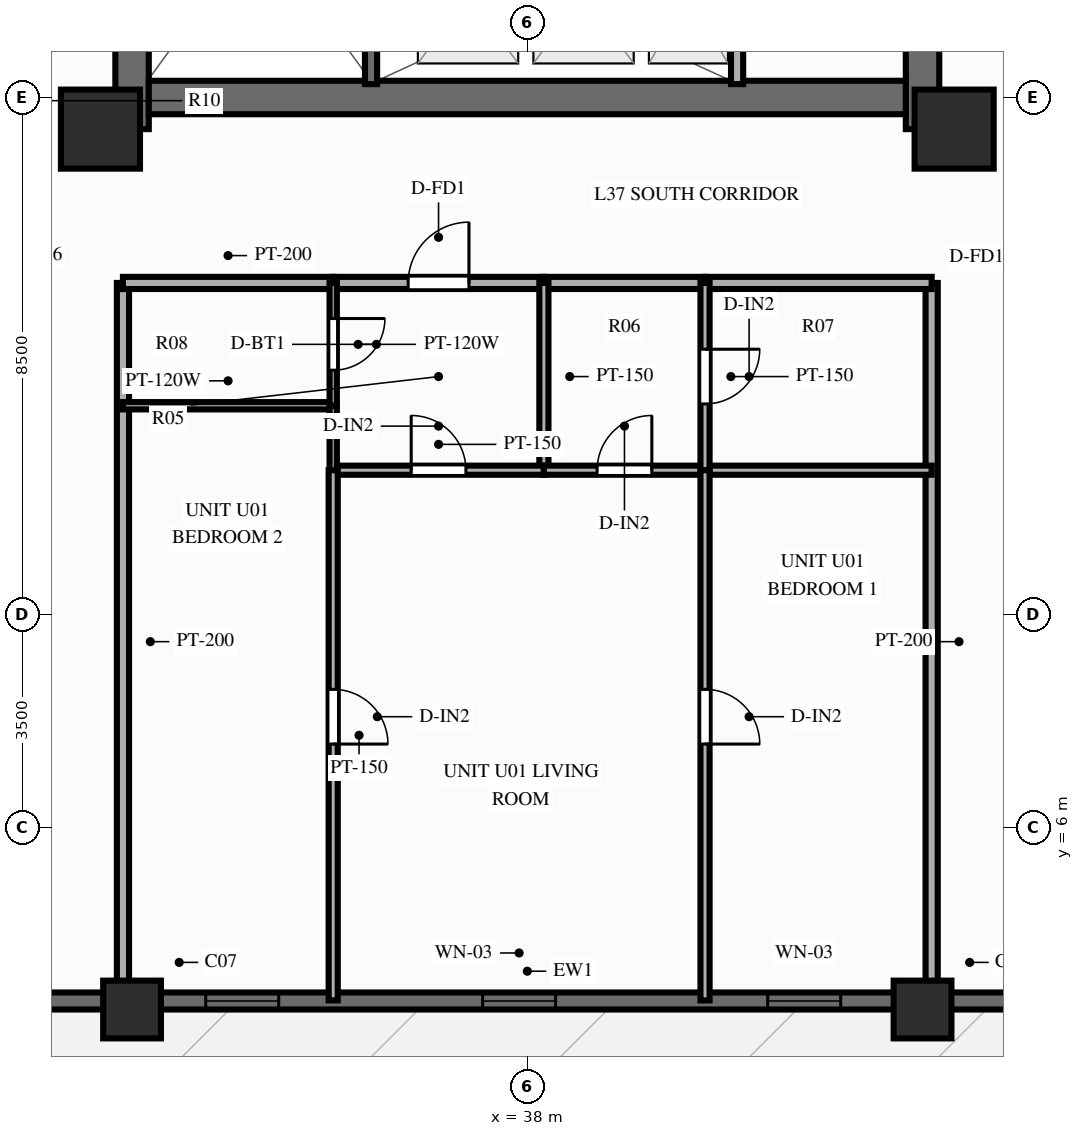
"""IFC4 building model, lengths in metres.
Left out: names, types, materials, properties, quantities, classifications, styles, units other than length and angle.
Written with IfcOpenShell. Run it as: python <this file> out.ifc"""

import sys

from ifc_helpers import new_model, si_unit, direction, frame, frame_2d, origin, origin_2d, place, context, subcontext, project, spatial, rectangle, extrude, source, transform, mapped, element, fill, save


model = new_model("IFC4")
c1 = context("Model", 3, precision=1e-05, world=origin(), true_north=direction((0.0, 1.0)))
c2 = subcontext(c1, "Body", "Model", "MODEL_VIEW")
j1 = project(units=[si_unit("LENGTHUNIT", "METRE"), si_unit("PLANEANGLEUNIT", "RADIAN")], contexts=[c1])
p1 = place(None, origin())
s1 = spatial("IfcSite", under=j1, at=p1, CompositionType="ELEMENT")
p2 = place(p1, origin())
s2 = spatial("IfcBuilding", under=s1, at=p2, CompositionType="ELEMENT")
p3 = place(p2, frame((0.0, 0.0, 116.85)))
s3 = spatial("IfcBuildingStorey", under=s2, at=p3, CompositionType="ELEMENT", Elevation=116.85)
p4 = place(p3, frame((31.5, 17.48, 0.0), z_axis=(0.0, 0.0, 1.0), x_axis=(0.0, 1.0, 0.0)))
e1 = element("IfcWall", 1, at=p4, inside=s3, PredefinedType="SHEAR", context=c2, shape_type="SweptSolid", body=[
    extrude(rectangle(XDim=19.04, YDim=0.55, at=frame_2d((9.52, 0.0))), origin(), (0.0, 0.0, 1.0), 3.0),
])
p5 = place(p4, frame((6.32, 0.0, 0.0)))
e2 = element("IfcOpeningElement", 2, at=p5, cuts=e1, PredefinedType="OPENING", context=c2, shape_type="SweptSolid", body=[
    extrude(rectangle(XDim=1.1, YDim=2.15, at=frame_2d((0.55, 1.075))), frame((0.0, 0.287, 0.0), z_axis=(0.0, -1.0, 0.0), x_axis=(1.0, 0.0, 0.0)), (0.0, 0.0, 1.0), 0.574),
])
p6 = place(p3, frame((44.5, 17.48, 0.0), z_axis=(0.0, 0.0, 1.0), x_axis=(0.0, 1.0, 0.0)))
e3 = element("IfcWall", 3, at=p6, inside=s3, PredefinedType="SHEAR", context=c2, shape_type="SweptSolid", body=[
    extrude(rectangle(XDim=19.04, YDim=0.55, at=frame_2d((9.52, 0.0))), origin(), (0.0, 0.0, 1.0), 3.0),
])
p7 = place(p6, frame((12.67, 0.0, 0.0), z_axis=(0.0, 0.0, 1.0), x_axis=(-1.0, 0.0, 0.0)))
e4 = element("IfcOpeningElement", 4, at=p7, cuts=e3, PredefinedType="OPENING", context=c2, shape_type="SweptSolid", body=[
    extrude(rectangle(XDim=1.1, YDim=2.15, at=frame_2d((0.55, 1.075))), frame((0.0, 0.287, 0.0), z_axis=(0.0, -1.0, 0.0), x_axis=(1.0, 0.0, 0.0)), (0.0, 0.0, 1.0), 0.574),
])
p8 = place(p3, frame((31.775, 18.0, 0.0), z_axis=(0.0, 0.0, 1.0), x_axis=(1.0, 0.0, 0.0)))
e5 = element("IfcWall", 5, at=p8, inside=s3, PredefinedType="SHEAR", context=c2, shape_type="SweptSolid", body=[
    extrude(rectangle(XDim=12.45, YDim=0.55, at=frame_2d((6.225, 0.0))), origin(), (0.0, 0.0, 1.0), 3.0),
])
m1 = source(origin(), c2, "Body", "SweptSolid", [
    extrude(rectangle(XDim=1.3, YDim=1.3, at=origin_2d()), origin(), (0.0, 0.0, 1.0), 3.0),
])
for number, where, z_axis, x_axis in (
    (6, (30.98, 17.48, 0.0), (0.0, 0.0, 1.0), (1.0, 0.0, 0.0)),
    (7, (45.02, 17.48, 0.0), (0.0, 0.0, 1.0), (1.0, 0.0, 0.0)),
):
    element("IfcColumn", number, at=place(p3, frame(where, z_axis=z_axis, x_axis=x_axis)), inside=s3, PredefinedType="COLUMN", context=c2, shape_type="MappedRepresentation", body=[
        mapped(m1, transform((0.0, 0.0, 0.0), scale=1.0)),
    ])
m2 = source(origin(), c2, "Body", "SweptSolid", [
    extrude(rectangle(XDim=0.95, YDim=0.95, at=origin_2d()), origin(), (0.0, 0.0, 1.0), 3.0),
])
for number, where, z_axis, x_axis in (
    (8, (31.5, 3.0, 0.0), (0.0, 0.0, 1.0), (1.0, 0.0, 0.0)),
    (9, (44.5, 3.0, 0.0), (0.0, 0.0, 1.0), (1.0, 0.0, 0.0)),
):
    element("IfcColumn", number, at=place(p3, frame(where, z_axis=z_axis, x_axis=x_axis)), inside=s3, PredefinedType="COLUMN", context=c2, shape_type="MappedRepresentation", body=[
        mapped(m2, transform((0.0, 0.0, 0.0), scale=1.0)),
    ])
p9 = place(p3, frame((16.2, 3.14, 0.0), z_axis=(0.0, 0.0, 1.0), x_axis=(1.0, 0.0, 0.0)))
e10 = element("IfcWall", 10, at=p9, inside=s3, PredefinedType="SOLIDWALL", context=c2, shape_type="SweptSolid", body=[
    extrude(rectangle(XDim=43.6, YDim=0.28, at=frame_2d((21.8, 0.0))), origin(), (0.0, 0.0, 1.0), 2.28),
])
p10 = place(p9, frame((8.2, 0.0, 0.0), z_axis=(0.0, 0.0, 1.0), x_axis=(-1.0, 0.0, 0.0)))
e11 = element("IfcOpeningElement", 11, at=p10, cuts=e10, PredefinedType="OPENING", context=c2, shape_type="SweptSolid", body=[
    extrude(rectangle(XDim=1.1, YDim=2.15, at=frame_2d((0.55, 1.075))), frame((0.0, 0.152, 0.0), z_axis=(0.0, -1.0, 0.0), x_axis=(1.0, 0.0, 0.0)), (0.0, 0.0, 1.0), 0.304),
])
p11 = place(p9, frame((16.511, 0.0, 0.25)))
e12 = element("IfcOpeningElement", 12, at=p11, cuts=e10, PredefinedType="OPENING", context=c2, shape_type="SweptSolid", body=[
    extrude(rectangle(XDim=1.2, YDim=1.5, at=frame_2d((0.6, 0.75))), frame((0.0, 0.152, 0.0), z_axis=(0.0, -1.0, 0.0), x_axis=(1.0, 0.0, 0.0)), (0.0, 0.0, 1.0), 0.304),
])
p12 = place(p9, frame((21.065, 0.0, 0.25)))
e13 = element("IfcOpeningElement", 13, at=p12, cuts=e10, PredefinedType="OPENING", context=c2, shape_type="SweptSolid", body=[
    extrude(rectangle(XDim=1.2, YDim=1.5, at=frame_2d((0.6, 0.75))), frame((0.0, 0.152, 0.0), z_axis=(0.0, -1.0, 0.0), x_axis=(1.0, 0.0, 0.0)), (0.0, 0.0, 1.0), 0.304),
])
p13 = place(p9, frame((25.754, 0.0, 0.25)))
e14 = element("IfcOpeningElement", 14, at=p13, cuts=e10, PredefinedType="OPENING", context=c2, shape_type="SweptSolid", body=[
    extrude(rectangle(XDim=1.2, YDim=1.5, at=frame_2d((0.6, 0.75))), frame((0.0, 0.152, 0.0), z_axis=(0.0, -1.0, 0.0), x_axis=(1.0, 0.0, 0.0)), (0.0, 0.0, 1.0), 0.304),
])
p14 = place(p9, frame((35.35, 0.0, 0.25)))
e15 = element("IfcOpeningElement", 15, at=p14, cuts=e10, PredefinedType="OPENING", context=c2, shape_type="SweptSolid", body=[
    extrude(rectangle(XDim=1.2, YDim=1.5, at=frame_2d((0.6, 0.75))), frame((0.0, 0.152, 0.0), z_axis=(0.0, -1.0, 0.0), x_axis=(1.0, 0.0, 0.0)), (0.0, 0.0, 1.0), 0.304),
])
p15 = place(p3, frame((41.45, 18.22, 0.0), z_axis=(0.0, 0.0, 1.0), x_axis=(0.0, 1.0, 0.0)))
e16 = element("IfcWall", 16, at=p15, inside=s3, PredefinedType="PARTITIONING", context=c2, shape_type="SweptSolid", body=[
    extrude(rectangle(XDim=2.96, YDim=0.2, at=frame_2d((1.48, 0.0))), origin(), (0.0, 0.0, 1.0), 2.79),
])
p16 = place(p3, frame((35.43, 18.22, 0.0), z_axis=(0.0, 0.0, 1.0), x_axis=(0.0, 1.0, 0.0)))
e17 = element("IfcWall", 17, at=p16, inside=s3, PredefinedType="SOLIDWALL", context=c2, shape_type="SweptSolid", body=[
    extrude(rectangle(XDim=7.22, YDim=0.2, at=frame_2d((3.61, 0.0))), origin(), (0.0, 0.0, 1.0), 2.79),
])
p17 = place(p16, frame((6.68, 0.0, 0.0), z_axis=(0.0, 0.0, 1.0), x_axis=(-1.0, 0.0, 0.0)))
e18 = element("IfcOpeningElement", 18, at=p17, cuts=e17, PredefinedType="OPENING", context=c2, shape_type="SweptSolid", body=[
    extrude(rectangle(XDim=1.1, YDim=2.15, at=frame_2d((0.55, 1.075))), frame((0.0, 0.112, 0.0), z_axis=(0.0, -1.0, 0.0), x_axis=(1.0, 0.0, 0.0)), (0.0, 0.0, 1.0), 0.224),
])
for number, where, z_axis, x_axis in (
    (19, (31.35, 14.95, 0.0), (0.0, 0.0, 1.0), (0.0, -1.0, 0.0)),
    (20, (44.65, 14.95, 0.0), (0.0, 0.0, 1.0), (0.0, -1.0, 0.0)),
):
    element("IfcWall", number, at=place(p3, frame(where, z_axis=z_axis, x_axis=x_axis)), inside=s3, PredefinedType="PARTITIONING", context=c2, shape_type="SweptSolid", body=[
        extrude(rectangle(XDim=11.8, YDim=0.2, at=frame_2d((5.9, 0.0))), origin(), (0.0, 0.0, 1.0), 2.34),
    ])
p18 = place(p3, frame((31.35, 14.95, 0.0), z_axis=(0.0, 0.0, 1.0), x_axis=(1.0, 0.0, 0.0)))
e21 = element("IfcWall", 21, at=p18, inside=s3, PredefinedType="PARTITIONING", context=c2, shape_type="SweptSolid", body=[
    extrude(rectangle(XDim=3.458, YDim=0.2, at=frame_2d((1.729, 0.0))), origin(), (0.0, 0.0, 1.0), 2.79),
])
p19 = place(p3, frame((34.808, 14.95, 0.0), z_axis=(0.0, 0.0, 1.0), x_axis=(1.0, 0.0, 0.0)))
e22 = element("IfcWall", 22, at=p19, inside=s3, PredefinedType="PARTITIONING", context=c2, shape_type="SweptSolid", body=[
    extrude(rectangle(XDim=3.465, YDim=0.2, at=frame_2d((1.732, 0.0))), origin(), (0.0, 0.0, 1.0), 2.79),
])
p20 = place(p19, frame((1.232, 0.0, 0.0)))
e23 = element("IfcOpeningElement", 23, at=p20, cuts=e22, PredefinedType="OPENING", context=c2, shape_type="SweptSolid", body=[
    extrude(rectangle(XDim=1.0, YDim=2.15, at=frame_2d((0.5, 1.075))), frame((0.0, 0.112, 0.0), z_axis=(0.0, -1.0, 0.0), x_axis=(1.0, 0.0, 0.0)), (0.0, 0.0, 1.0), 0.224),
])
p21 = place(p3, frame((38.273, 14.95, 0.0), z_axis=(0.0, 0.0, 1.0), x_axis=(1.0, 0.0, 0.0)))
e24 = element("IfcWall", 24, at=p21, inside=s3, PredefinedType="PARTITIONING", context=c2, shape_type="SweptSolid", body=[
    extrude(rectangle(XDim=2.65, YDim=0.2, at=frame_2d((1.325, 0.0))), origin(), (0.0, 0.0, 1.0), 2.79),
])
p22 = place(p3, frame((38.273, 14.95, 0.0), z_axis=(0.0, 0.0, 1.0), x_axis=(0.0, -1.0, 0.0)))
e25 = element("IfcWall", 25, at=p22, inside=s3, PredefinedType="PARTITIONING", context=c2, shape_type="SweptSolid", body=[
    extrude(rectangle(XDim=3.08, YDim=0.15, at=frame_2d((1.54, 0.0))), origin(), (0.0, 0.0, 1.0), 2.79),
])
p23 = place(p3, frame((34.808, 11.87, 0.0), z_axis=(0.0, 0.0, 1.0), x_axis=(1.0, 0.0, 0.0)))
e26 = element("IfcWall", 26, at=p23, inside=s3, PredefinedType="PARTITIONING", context=c2, shape_type="SweptSolid", body=[
    extrude(rectangle(XDim=3.465, YDim=0.15, at=frame_2d((1.732, 0.0))), origin(), (0.0, 0.0, 1.0), 2.79),
])
p24 = place(p23, frame((1.282, 0.0, 0.0)))
e27 = element("IfcOpeningElement", 27, at=p24, cuts=e26, PredefinedType="OPENING", context=c2, shape_type="SweptSolid", body=[
    extrude(rectangle(XDim=0.9, YDim=2.1, at=frame_2d((0.45, 1.05))), frame((0.0, 0.087, 0.0), z_axis=(0.0, -1.0, 0.0), x_axis=(1.0, 0.0, 0.0)), (0.0, 0.0, 1.0), 0.174),
])
p25 = place(p3, frame((38.273, 11.87, 0.0), z_axis=(0.0, 0.0, 1.0), x_axis=(1.0, 0.0, 0.0)))
e28 = element("IfcWall", 28, at=p25, inside=s3, PredefinedType="PARTITIONING", context=c2, shape_type="SweptSolid", body=[
    extrude(rectangle(XDim=2.65, YDim=0.15, at=frame_2d((1.325, 0.0))), origin(), (0.0, 0.0, 1.0), 2.79),
])
p26 = place(p25, frame((0.875, 0.0, 0.0)))
e29 = element("IfcOpeningElement", 29, at=p26, cuts=e28, PredefinedType="OPENING", context=c2, shape_type="SweptSolid", body=[
    extrude(rectangle(XDim=0.9, YDim=2.1, at=frame_2d((0.45, 1.05))), frame((0.0, 0.087, 0.0), z_axis=(0.0, -1.0, 0.0), x_axis=(1.0, 0.0, 0.0)), (0.0, 0.0, 1.0), 0.174),
])
p27 = place(p3, frame((40.923, 14.95, 0.0), z_axis=(0.0, 0.0, 1.0), x_axis=(1.0, 0.0, 0.0)))
e30 = element("IfcWall", 30, at=p27, inside=s3, PredefinedType="PARTITIONING", context=c2, shape_type="SweptSolid", body=[
    extrude(rectangle(XDim=3.727, YDim=0.2, at=frame_2d((1.864, 0.0))), origin(), (0.0, 0.0, 1.0), 2.79),
])
p28 = place(p3, frame((31.35, 12.93, 0.0), z_axis=(0.0, 0.0, 1.0), x_axis=(1.0, 0.0, 0.0)))
e31 = element("IfcWall", 31, at=p28, inside=s3, PredefinedType="PARTITIONING", context=c2, shape_type="SweptSolid", body=[
    extrude(rectangle(XDim=3.458, YDim=0.12, at=frame_2d((1.729, 0.0))), origin(), (0.0, 0.0, 1.0), 2.79),
])
p29 = place(p3, frame((40.923, 11.87, 0.0), z_axis=(0.0, 0.0, 1.0), x_axis=(1.0, 0.0, 0.0)))
e32 = element("IfcWall", 32, at=p29, inside=s3, PredefinedType="PARTITIONING", context=c2, shape_type="SweptSolid", body=[
    extrude(rectangle(XDim=3.727, YDim=0.15, at=frame_2d((1.864, 0.0))), origin(), (0.0, 0.0, 1.0), 2.79),
])
p30 = place(p3, frame((34.808, 14.95, 0.0), z_axis=(0.0, 0.0, 1.0), x_axis=(0.0, -1.0, 0.0)))
e33 = element("IfcWall", 33, at=p30, inside=s3, PredefinedType="PARTITIONING", context=c2, shape_type="SweptSolid", body=[
    extrude(rectangle(XDim=2.02, YDim=0.12, at=frame_2d((1.01, 0.0))), origin(), (0.0, 0.0, 1.0), 2.79),
])
p31 = place(p30, frame((0.585, 0.0, 0.0)))
e34 = element("IfcOpeningElement", 34, at=p31, cuts=e33, PredefinedType="OPENING", context=c2, shape_type="SweptSolid", body=[
    extrude(rectangle(XDim=0.85, YDim=2.05, at=frame_2d((0.425, 1.025))), frame((0.0, 0.072, 0.0), z_axis=(0.0, -1.0, 0.0), x_axis=(1.0, 0.0, 0.0)), (0.0, 0.0, 1.0), 0.144),
])
p32 = place(p3, frame((34.808, 12.93, 0.0), z_axis=(0.0, 0.0, 1.0), x_axis=(0.0, -1.0, 0.0)))
e35 = element("IfcWall", 35, at=p32, inside=s3, PredefinedType="PARTITIONING", context=c2, shape_type="SweptSolid", body=[
    extrude(rectangle(XDim=1.06, YDim=0.12, at=frame_2d((0.53, 0.0))), origin(), (0.0, 0.0, 1.0), 2.79),
])
p33 = place(p3, frame((34.808, 11.87, 0.0), z_axis=(0.0, 0.0, 1.0), x_axis=(0.0, -1.0, 0.0)))
e36 = element("IfcWall", 36, at=p33, inside=s3, PredefinedType="PARTITIONING", context=c2, shape_type="SweptSolid", body=[
    extrude(rectangle(XDim=8.72, YDim=0.15, at=frame_2d((4.36, 0.0))), origin(), (0.0, 0.0, 1.0), 2.79),
])
p34 = place(p33, frame((3.604, 0.0, 0.0)))
e37 = element("IfcOpeningElement", 37, at=p34, cuts=e36, PredefinedType="OPENING", context=c2, shape_type="SweptSolid", body=[
    extrude(rectangle(XDim=0.9, YDim=2.1, at=frame_2d((0.45, 1.05))), frame((0.0, 0.087, 0.0), z_axis=(0.0, -1.0, 0.0), x_axis=(1.0, 0.0, 0.0)), (0.0, 0.0, 1.0), 0.174),
])
p35 = place(p3, frame((40.923, 14.95, 0.0), z_axis=(0.0, 0.0, 1.0), x_axis=(0.0, -1.0, 0.0)))
e38 = element("IfcWall", 38, at=p35, inside=s3, PredefinedType="PARTITIONING", context=c2, shape_type="SweptSolid", body=[
    extrude(rectangle(XDim=3.08, YDim=0.15, at=frame_2d((1.54, 0.0))), origin(), (0.0, 0.0, 1.0), 2.79),
])
p36 = place(p35, frame((1.09, 0.0, 0.0)))
e39 = element("IfcOpeningElement", 39, at=p36, cuts=e38, PredefinedType="OPENING", context=c2, shape_type="SweptSolid", body=[
    extrude(rectangle(XDim=0.9, YDim=2.1, at=frame_2d((0.45, 1.05))), frame((0.0, 0.087, 0.0), z_axis=(0.0, -1.0, 0.0), x_axis=(1.0, 0.0, 0.0)), (0.0, 0.0, 1.0), 0.174),
])
p37 = place(p3, frame((40.923, 11.87, 0.0), z_axis=(0.0, 0.0, 1.0), x_axis=(0.0, -1.0, 0.0)))
e40 = element("IfcWall", 40, at=p37, inside=s3, PredefinedType="PARTITIONING", context=c2, shape_type="SweptSolid", body=[
    extrude(rectangle(XDim=8.72, YDim=0.15, at=frame_2d((4.36, 0.0))), origin(), (0.0, 0.0, 1.0), 2.79),
])
p38 = place(p37, frame((3.604, 0.0, 0.0)))
e41 = element("IfcOpeningElement", 41, at=p38, cuts=e40, PredefinedType="OPENING", context=c2, shape_type="SweptSolid", body=[
    extrude(rectangle(XDim=0.9, YDim=2.1, at=frame_2d((0.45, 1.05))), frame((0.0, 0.087, 0.0), z_axis=(0.0, -1.0, 0.0), x_axis=(1.0, 0.0, 0.0)), (0.0, 0.0, 1.0), 0.174),
])
m3 = source(origin(), c2, "Body", "SweptSolid", [
    extrude(rectangle(XDim=1.2, YDim=1.5, at=frame_2d((0.6, 0.75))), frame((0.0, 0.03, 0.0), z_axis=(0.0, -1.0, 0.0), x_axis=(1.0, 0.0, 0.0)), (0.0, 0.0, 1.0), 0.06),
])
p39 = place(p11, origin())
e42 = element("IfcWindow", 42, at=p39, inside=s3, PartitioningType="SINGLE_PANEL", PredefinedType="WINDOW", context=c2, shape_type="MappedRepresentation", body=[
    mapped(m3, transform((0.0, 0.0, 0.0), scale=1.0)),
])
fill(e12, e42)
p40 = place(p12, origin())
e43 = element("IfcWindow", 43, at=p40, inside=s3, PartitioningType="SINGLE_PANEL", PredefinedType="WINDOW", context=c2, shape_type="MappedRepresentation", body=[
    mapped(m3, transform((0.0, 0.0, 0.0), scale=1.0)),
])
fill(e13, e43)
p41 = place(p13, origin())
e44 = element("IfcWindow", 44, at=p41, inside=s3, PartitioningType="SINGLE_PANEL", PredefinedType="WINDOW", context=c2, shape_type="MappedRepresentation", body=[
    mapped(m3, transform((0.0, 0.0, 0.0), scale=1.0)),
])
fill(e14, e44)
m4 = source(origin(), c2, "Body", "SweptSolid", [
    extrude(rectangle(XDim=1.0, YDim=2.15, at=frame_2d((0.5, 1.075))), frame((0.0, 0.025, 0.0), z_axis=(0.0, -1.0, 0.0), x_axis=(1.0, 0.0, 0.0)), (0.0, 0.0, 1.0), 0.05),
])
p42 = place(p20, origin())
e45 = element("IfcDoor", 45, at=p42, inside=s3, OperationType="SINGLE_SWING_RIGHT", PredefinedType="DOOR", context=c2, shape_type="MappedRepresentation", body=[
    mapped(m4, transform((0.0, 0.0, 0.0), scale=1.0)),
])
fill(e23, e45)
m5 = source(origin(), c2, "Body", "SweptSolid", [
    extrude(rectangle(XDim=0.9, YDim=2.1, at=frame_2d((0.45, 1.05))), frame((0.0, 0.025, 0.0), z_axis=(0.0, -1.0, 0.0), x_axis=(1.0, 0.0, 0.0)), (0.0, 0.0, 1.0), 0.05),
])
p43 = place(p24, origin())
e46 = element("IfcDoor", 46, at=p43, inside=s3, OperationType="SINGLE_SWING_LEFT", PredefinedType="DOOR", context=c2, shape_type="MappedRepresentation", body=[
    mapped(m5, transform((0.0, 0.0, 0.0), scale=1.0)),
])
fill(e27, e46)
p44 = place(p26, origin())
e47 = element("IfcDoor", 47, at=p44, inside=s3, OperationType="SINGLE_SWING_RIGHT", PredefinedType="DOOR", context=c2, shape_type="MappedRepresentation", body=[
    mapped(m5, transform((0.0, 0.0, 0.0), scale=1.0)),
])
fill(e29, e47)
m6 = source(origin(), c2, "Body", "SweptSolid", [
    extrude(rectangle(XDim=0.85, YDim=2.05, at=frame_2d((0.425, 1.025))), frame((0.0, 0.025, 0.0), z_axis=(0.0, -1.0, 0.0), x_axis=(1.0, 0.0, 0.0)), (0.0, 0.0, 1.0), 0.05),
])
p45 = place(p31, origin())
e48 = element("IfcDoor", 48, at=p45, inside=s3, OperationType="SINGLE_SWING_LEFT", PredefinedType="DOOR", context=c2, shape_type="MappedRepresentation", body=[
    mapped(m6, transform((0.0, 0.0, 0.0), scale=1.0)),
])
fill(e34, e48)
p46 = place(p34, origin())
e49 = element("IfcDoor", 49, at=p46, inside=s3, OperationType="SINGLE_SWING_RIGHT", PredefinedType="DOOR", context=c2, shape_type="MappedRepresentation", body=[
    mapped(m5, transform((0.0, 0.0, 0.0), scale=1.0)),
])
fill(e37, e49)
p47 = place(p36, origin())
e50 = element("IfcDoor", 50, at=p47, inside=s3, OperationType="SINGLE_SWING_LEFT", PredefinedType="DOOR", context=c2, shape_type="MappedRepresentation", body=[
    mapped(m5, transform((0.0, 0.0, 0.0), scale=1.0)),
])
fill(e39, e50)
p48 = place(p38, origin())
e51 = element("IfcDoor", 51, at=p48, inside=s3, OperationType="SINGLE_SWING_RIGHT", PredefinedType="DOOR", context=c2, shape_type="MappedRepresentation", body=[
    mapped(m5, transform((0.0, 0.0, 0.0), scale=1.0)),
])
fill(e41, e51)
save(model, sys.argv[1])
